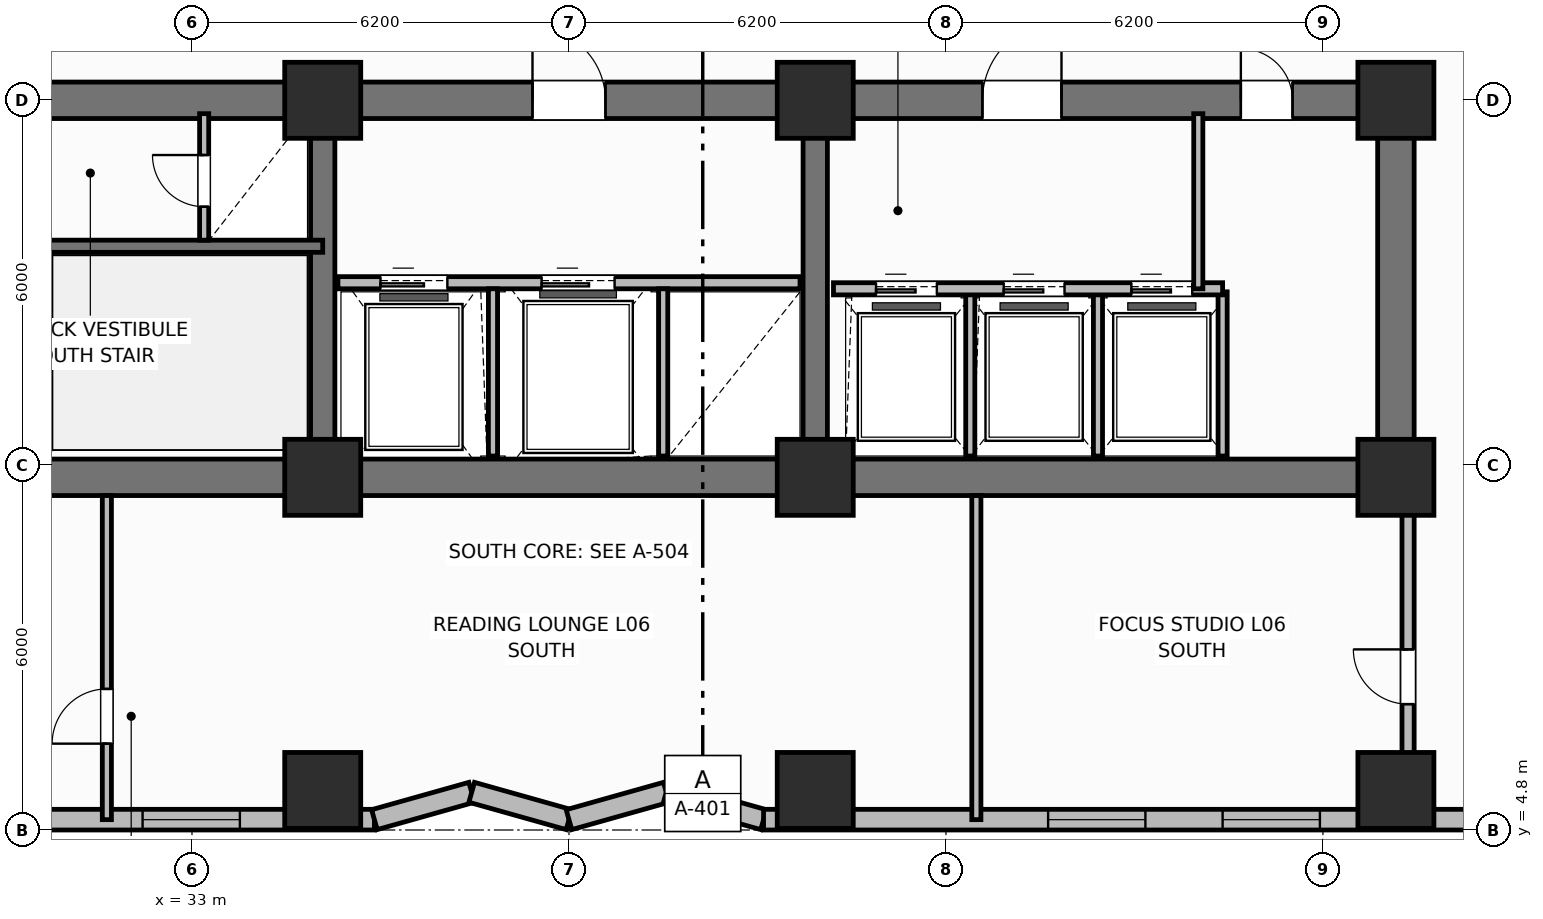
"""IFC4 building model, lengths in metres.
Left out: names, types, materials, properties, quantities, classifications, styles, units other than length and angle.
Written with IfcOpenShell. Run it as: python <this file> out.ifc"""

import sys

from ifc_helpers import new_model, si_unit, direction, frame, frame_2d, origin, origin_2d, place, context, subcontext, project, spatial, rectangle, extrude, element, fill, save


model = new_model("IFC4")
c1 = context("Model", 3, precision=1e-05, world=origin(), true_north=direction((0.0, 1.0)))
c2 = subcontext(c1, "Body", "Model", "MODEL_VIEW")
j1 = project(units=[si_unit("LENGTHUNIT", "METRE"), si_unit("PLANEANGLEUNIT", "RADIAN")], contexts=[c1])
p1 = place(None, origin())
s1 = spatial("IfcSite", under=j1, at=p1, CompositionType="ELEMENT")
p2 = place(p1, origin())
s2 = spatial("IfcBuilding", under=s1, at=p2, CompositionType="ELEMENT")
p3 = place(p2, frame((0.0, 0.0, 28.8)))
s3 = spatial("IfcBuildingStorey", under=s2, at=p3, CompositionType="ELEMENT", Elevation=28.8)
p4 = place(p3, frame((52.8, 10.6, 0.0), z_axis=(0.0, 0.0, 1.0), x_axis=(-1.0, 0.0, 0.0)))
e1 = element("IfcWall", 1, at=p4, inside=s3, PredefinedType="SHEAR", context=c2, shape_type="SweptSolid", body=[
    extrude(rectangle(XDim=27.2, YDim=0.6, at=frame_2d((13.6, 0.0))), origin(), (0.0, 0.0, 1.0), 3.7),
])
p5 = place(p3, frame((52.8, 10.9, 0.0), z_axis=(0.0, 0.0, 1.0), x_axis=(0.0, 1.0, 0.0)))
e2 = element("IfcWall", 2, at=p5, inside=s3, PredefinedType="SHEAR", context=c2, shape_type="SweptSolid", body=[
    extrude(rectangle(XDim=5.6, YDim=0.6, at=frame_2d((2.8, 0.0))), origin(), (0.0, 0.0, 1.0), 3.7),
])
p6 = place(p3, frame((25.6, 16.8, 0.0), z_axis=(0.0, 0.0, 1.0), x_axis=(1.0, 0.0, 0.0)))
e3 = element("IfcWall", 3, at=p6, inside=s3, PredefinedType="SHEAR", context=c2, shape_type="SweptSolid", body=[
    extrude(rectangle(XDim=27.2, YDim=0.6, at=frame_2d((13.6, 0.0))), origin(), (0.0, 0.0, 1.0), 3.7),
])
p7 = place(p6, frame((1.9, 0.0, 0.0)))
e4 = element("IfcOpeningElement", 4, at=p7, cuts=e3, PredefinedType="OPENING", context=c2, shape_type="SweptSolid", body=[
    extrude(rectangle(XDim=1.1, YDim=2.15, at=frame_2d((0.55, 1.075))), frame((0.0, 0.31, 0.0), z_axis=(0.0, -1.0, 0.0), x_axis=(1.0, 0.0, 0.0)), (0.0, 0.0, 1.0), 0.62),
])
p8 = place(p6, frame((13.0, 0.0, 0.0)))
e5 = element("IfcOpeningElement", 5, at=p8, cuts=e3, PredefinedType="OPENING", context=c2, shape_type="SweptSolid", body=[
    extrude(rectangle(XDim=1.2, YDim=2.15, at=frame_2d((0.6, 1.075))), frame((0.0, 0.31, 0.0), z_axis=(0.0, -1.0, 0.0), x_axis=(1.0, 0.0, 0.0)), (0.0, 0.0, 1.0), 0.62),
])
p9 = place(p6, frame((20.4, 0.0, 0.0)))
e6 = element("IfcOpeningElement", 6, at=p9, cuts=e3, PredefinedType="OPENING", context=c2, shape_type="SweptSolid", body=[
    extrude(rectangle(XDim=1.3, YDim=2.2, at=frame_2d((0.65, 1.1))), frame((0.0, 0.31, 0.0), z_axis=(0.0, -1.0, 0.0), x_axis=(1.0, 0.0, 0.0)), (0.0, 0.0, 1.0), 0.62),
])
p10 = place(p6, frame((24.65, 0.0, 0.0)))
e7 = element("IfcOpeningElement", 7, at=p10, cuts=e3, PredefinedType="OPENING", context=c2, shape_type="SweptSolid", body=[
    extrude(rectangle(XDim=0.85, YDim=2.1, at=frame_2d((0.425, 1.05))), frame((0.0, 0.31, 0.0), z_axis=(0.0, -1.0, 0.0), x_axis=(1.0, 0.0, 0.0)), (0.0, 0.0, 1.0), 0.62),
])
for number, where, z_axis, x_axis in (
    (8, (35.15, 10.9, 0.0), (0.0, 0.0, 1.0), (0.0, 1.0, 0.0)),
    (9, (43.25, 10.9, 0.0), (0.0, 0.0, 1.0), (0.0, 1.0, 0.0)),
):
    element("IfcWall", number, at=place(p3, frame(where, z_axis=z_axis, x_axis=x_axis)), inside=s3, PredefinedType="SHEAR", context=c2, shape_type="SweptSolid", body=[
        extrude(rectangle(XDim=5.6, YDim=0.4, at=frame_2d((2.8, 0.0))), origin(), (0.0, 0.0, 1.0), 3.7),
    ])
for number, where, z_axis, x_axis in (
    (10, (35.15, 10.6, 0.0), (0.0, 0.0, 1.0), (1.0, 0.0, 0.0)),
    (11, (35.15, 16.8, 0.0), (0.0, 0.0, 1.0), (1.0, 0.0, 0.0)),
    (12, (43.25, 10.6, 0.0), (0.0, 0.0, 1.0), (1.0, 0.0, 0.0)),
    (13, (43.25, 16.8, 0.0), (0.0, 0.0, 1.0), (1.0, 0.0, 0.0)),
    (14, (52.8, 10.6, 0.0), (0.0, 0.0, 1.0), (1.0, 0.0, 0.0)),
    (15, (52.8, 16.8, 0.0), (0.0, 0.0, 1.0), (1.0, 0.0, 0.0)),
    (16, (35.15, 5.45, 0.0), (0.0, 0.0, 1.0), (1.0, 0.0, 0.0)),
    (17, (43.25, 5.45, 0.0), (0.0, 0.0, 1.0), (1.0, 0.0, 0.0)),
    (18, (52.8, 5.45, 0.0), (0.0, 0.0, 1.0), (1.0, 0.0, 0.0)),
):
    element("IfcColumn", number, at=place(p3, frame(where, z_axis=z_axis, x_axis=x_axis)), inside=s3, PredefinedType="COLUMN", context=c2, shape_type="SweptSolid", body=[
        extrude(rectangle(XDim=1.25, YDim=1.25, at=origin_2d()), origin(), (0.0, 0.0, 1.0), 3.7),
    ])
p11 = place(p3, frame((18.6, 4.97, 0.0), z_axis=(0.0, 0.0, 1.0), x_axis=(1.0, 0.0, 0.0)))
e19 = element("IfcWall", 19, at=p11, inside=s3, PredefinedType="SOLIDWALL", context=c2, shape_type="SweptSolid", body=[
    extrude(rectangle(XDim=17.4, YDim=0.34, at=frame_2d((8.7, 0.0))), origin(), (0.0, 0.0, 1.0), 2.7),
])
p12 = place(p11, frame((1.863, 0.0, 0.68)))
e20 = element("IfcOpeningElement", 20, at=p12, cuts=e19, PredefinedType="OPENING", context=c2, shape_type="SweptSolid", body=[
    extrude(rectangle(XDim=1.6, YDim=1.9, at=frame_2d((0.8, 0.95))), frame((0.0, 0.18, 0.0), z_axis=(0.0, -1.0, 0.0), x_axis=(1.0, 0.0, 0.0)), (0.0, 0.0, 1.0), 0.36),
])
p13 = place(p11, frame((9.913, 0.0, 0.68)))
e21 = element("IfcOpeningElement", 21, at=p13, cuts=e19, PredefinedType="OPENING", context=c2, shape_type="SweptSolid", body=[
    extrude(rectangle(XDim=1.6, YDim=1.9, at=frame_2d((0.8, 0.95))), frame((0.0, 0.18, 0.0), z_axis=(0.0, -1.0, 0.0), x_axis=(1.0, 0.0, 0.0)), (0.0, 0.0, 1.0), 0.36),
])
p14 = place(p11, frame((13.587, 0.0, 0.68)))
e22 = element("IfcOpeningElement", 22, at=p14, cuts=e19, PredefinedType="OPENING", context=c2, shape_type="SweptSolid", body=[
    extrude(rectangle(XDim=1.6, YDim=1.9, at=frame_2d((0.8, 0.95))), frame((0.0, 0.18, 0.0), z_axis=(0.0, -1.0, 0.0), x_axis=(1.0, 0.0, 0.0)), (0.0, 0.0, 1.0), 0.36),
])
p15 = place(p3, frame((36.0, 4.97, 0.0), z_axis=(0.0, 0.0, 1.0), x_axis=(0.962662902433, 0.270703040766, 0.0)))
e23 = element("IfcWall", 23, at=p15, inside=s3, PredefinedType="SOLIDWALL", context=c2, shape_type="SweptSolid", body=[
    extrude(rectangle(XDim=1.662, YDim=0.34, at=frame_2d((0.831, 0.0))), origin(), (0.0, 0.0, 1.0), 2.7),
])
p16 = place(p3, frame((37.6, 5.42, 0.0), z_axis=(0.0, 0.0, 1.0), x_axis=(0.962652136636, -0.270741322725, 0.0)))
e24 = element("IfcWall", 24, at=p16, inside=s3, PredefinedType="SOLIDWALL", context=c2, shape_type="SweptSolid", body=[
    extrude(rectangle(XDim=1.662, YDim=0.34, at=frame_2d((0.831, 0.0))), origin(), (0.0, 0.0, 1.0), 2.7),
])
p17 = place(p3, frame((39.2, 4.97, 0.0), z_axis=(0.0, 0.0, 1.0), x_axis=(0.962662902433, 0.270703040766, 0.0)))
e25 = element("IfcWall", 25, at=p17, inside=s3, PredefinedType="SOLIDWALL", context=c2, shape_type="SweptSolid", body=[
    extrude(rectangle(XDim=1.662, YDim=0.34, at=frame_2d((0.831, 0.0))), origin(), (0.0, 0.0, 1.0), 2.7),
])
p18 = place(p3, frame((40.8, 5.42, 0.0), z_axis=(0.0, 0.0, 1.0), x_axis=(0.962652136636, -0.270741322725, 0.0)))
e26 = element("IfcWall", 26, at=p18, inside=s3, PredefinedType="SOLIDWALL", context=c2, shape_type="SweptSolid", body=[
    extrude(rectangle(XDim=1.662, YDim=0.34, at=frame_2d((0.831, 0.0))), origin(), (0.0, 0.0, 1.0), 2.7),
])
p19 = place(p3, frame((42.4, 4.97, 0.0), z_axis=(0.0, 0.0, 1.0), x_axis=(1.0, 0.0, 0.0)))
e27 = element("IfcWall", 27, at=p19, inside=s3, PredefinedType="SOLIDWALL", context=c2, shape_type="SweptSolid", body=[
    extrude(rectangle(XDim=17.4, YDim=0.34, at=frame_2d((8.7, 0.0))), origin(), (0.0, 0.0, 1.0), 2.7),
])
p20 = place(p19, frame((4.68, 0.0, 0.68)))
e28 = element("IfcOpeningElement", 28, at=p20, cuts=e27, PredefinedType="OPENING", context=c2, shape_type="SweptSolid", body=[
    extrude(rectangle(XDim=1.6, YDim=1.9, at=frame_2d((0.8, 0.95))), frame((0.0, 0.18, 0.0), z_axis=(0.0, -1.0, 0.0), x_axis=(1.0, 0.0, 0.0)), (0.0, 0.0, 1.0), 0.36),
])
p21 = place(p19, frame((7.55, 0.0, 0.68)))
e29 = element("IfcOpeningElement", 29, at=p21, cuts=e27, PredefinedType="OPENING", context=c2, shape_type="SweptSolid", body=[
    extrude(rectangle(XDim=1.6, YDim=1.9, at=frame_2d((0.8, 0.95))), frame((0.0, 0.18, 0.0), z_axis=(0.0, -1.0, 0.0), x_axis=(1.0, 0.0, 0.0)), (0.0, 0.0, 1.0), 0.36),
])
p22 = place(p19, frame((14.34, 0.0, 0.68)))
e30 = element("IfcOpeningElement", 30, at=p22, cuts=e27, PredefinedType="OPENING", context=c2, shape_type="SweptSolid", body=[
    extrude(rectangle(XDim=1.6, YDim=1.9, at=frame_2d((0.8, 0.95))), frame((0.0, 0.18, 0.0), z_axis=(0.0, -1.0, 0.0), x_axis=(1.0, 0.0, 0.0)), (0.0, 0.0, 1.0), 0.36),
])
p23 = place(p3, frame((25.6, 14.4, 0.0), z_axis=(0.0, 0.0, 1.0), x_axis=(1.0, 0.0, 0.0)))
e31 = element("IfcWall", 31, at=p23, inside=s3, PredefinedType="SHEAR", context=c2, shape_type="SweptSolid", body=[
    extrude(rectangle(XDim=9.55, YDim=0.2, at=frame_2d((4.775, 0.0))), origin(), (0.0, 0.0, 1.0), 3.7),
])
p24 = place(p23, frame((1.05, 0.0, 0.0)))
e32 = element("IfcOpeningElement", 32, at=p24, cuts=e31, PredefinedType="OPENING", context=c2, shape_type="SweptSolid", body=[
    extrude(rectangle(XDim=1.1, YDim=2.15, at=frame_2d((0.55, 1.075))), frame((0.0, 0.11, 0.0), z_axis=(0.0, -1.0, 0.0), x_axis=(1.0, 0.0, 0.0)), (0.0, 0.0, 1.0), 0.22),
])
p25 = place(p3, frame((33.2, 14.5, 0.0), z_axis=(0.0, 0.0, 1.0), x_axis=(0.0, 1.0, 0.0)))
e33 = element("IfcWall", 33, at=p25, inside=s3, PredefinedType="PARTITIONING", context=c2, shape_type="SweptSolid", body=[
    extrude(rectangle(XDim=2.08, YDim=0.15, at=frame_2d((1.04, 0.0))), origin(), (0.0, 0.0, 1.0), 2.53),
])
p26 = place(p25, frame((0.55, 0.0, 0.0)))
e34 = element("IfcOpeningElement", 34, at=p26, cuts=e33, PredefinedType="OPENING", context=c2, shape_type="SweptSolid", body=[
    extrude(rectangle(XDim=0.85, YDim=2.05, at=frame_2d((0.425, 1.025))), frame((0.0, 0.085, 0.0), z_axis=(0.0, -1.0, 0.0), x_axis=(1.0, 0.0, 0.0)), (0.0, 0.0, 1.0), 0.17),
])
p27 = place(p3, frame((35.4, 13.8, 0.0), z_axis=(0.0, 0.0, 1.0), x_axis=(1.0, 0.0, 0.0)))
e35 = element("IfcWall", 35, at=p27, inside=s3, PredefinedType="PARTITIONING", context=c2, shape_type="SweptSolid", body=[
    extrude(rectangle(XDim=7.6, YDim=0.2, at=frame_2d((3.8, 0.0))), origin(), (0.0, 0.0, 1.0), 2.3),
])
p28 = place(p27, frame((0.7, 0.0, 0.0)))
e36 = element("IfcOpeningElement", 36, at=p28, cuts=e35, PredefinedType="OPENING", context=c2, shape_type="SweptSolid", body=[
    extrude(rectangle(XDim=1.1, YDim=2.15, at=frame_2d((0.55, 1.075))), frame((0.0, 0.11, 0.0), z_axis=(0.0, -1.0, 0.0), x_axis=(1.0, 0.0, 0.0)), (0.0, 0.0, 1.0), 0.22),
])
p29 = place(p27, frame((3.35, 0.0, 0.0)))
e37 = element("IfcOpeningElement", 37, at=p29, cuts=e35, PredefinedType="OPENING", context=c2, shape_type="SweptSolid", body=[
    extrude(rectangle(XDim=1.2, YDim=2.15, at=frame_2d((0.6, 1.075))), frame((0.0, 0.11, 0.0), z_axis=(0.0, -1.0, 0.0), x_axis=(1.0, 0.0, 0.0)), (0.0, 0.0, 1.0), 0.22),
])
for number, where, z_axis, x_axis in (
    (38, (37.95, 10.95, 0.0), (0.0, 0.0, 1.0), (0.0, 1.0, 0.0)),
    (39, (40.75, 10.95, 0.0), (0.0, 0.0, 1.0), (0.0, 1.0, 0.0)),
):
    element("IfcWall", number, at=place(p3, frame(where, z_axis=z_axis, x_axis=x_axis)), inside=s3, PredefinedType="PARTITIONING", context=c2, shape_type="SweptSolid", body=[
        extrude(rectangle(XDim=2.75, YDim=0.15, at=frame_2d((1.375, 0.0))), origin(), (0.0, 0.0, 1.0), 2.53),
    ])
for number, where, z_axis, x_axis in (
    (40, (45.8, 10.95, 0.0), (0.0, 0.0, 1.0), (0.0, 1.0, 0.0)),
    (41, (47.9, 10.95, 0.0), (0.0, 0.0, 1.0), (0.0, 1.0, 0.0)),
    (42, (49.95, 10.95, 0.0), (0.0, 0.0, 1.0), (0.0, 1.0, 0.0)),
):
    element("IfcWall", number, at=place(p3, frame(where, z_axis=z_axis, x_axis=x_axis)), inside=s3, PredefinedType="PARTITIONING", context=c2, shape_type="SweptSolid", body=[
        extrude(rectangle(XDim=2.7, YDim=0.15, at=frame_2d((1.35, 0.0))), origin(), (0.0, 0.0, 1.0), 2.53),
    ])
p30 = place(p3, frame((43.55, 13.7, 0.0), z_axis=(0.0, 0.0, 1.0), x_axis=(1.0, 0.0, 0.0)))
e43 = element("IfcWall", 43, at=p30, inside=s3, PredefinedType="PARTITIONING", context=c2, shape_type="SweptSolid", body=[
    extrude(rectangle(XDim=6.4, YDim=0.2, at=frame_2d((3.2, 0.0))), origin(), (0.0, 0.0, 1.0), 2.53),
])
p31 = place(p30, frame((0.7, 0.0, 0.0)))
e44 = element("IfcOpeningElement", 44, at=p31, cuts=e43, PredefinedType="OPENING", context=c2, shape_type="SweptSolid", body=[
    extrude(rectangle(XDim=1.0, YDim=2.15, at=frame_2d((0.5, 1.075))), frame((0.0, 0.11, 0.0), z_axis=(0.0, -1.0, 0.0), x_axis=(1.0, 0.0, 0.0)), (0.0, 0.0, 1.0), 0.22),
])
p32 = place(p30, frame((2.8, 0.0, 0.0)))
e45 = element("IfcOpeningElement", 45, at=p32, cuts=e43, PredefinedType="OPENING", context=c2, shape_type="SweptSolid", body=[
    extrude(rectangle(XDim=1.0, YDim=2.15, at=frame_2d((0.5, 1.075))), frame((0.0, 0.11, 0.0), z_axis=(0.0, -1.0, 0.0), x_axis=(1.0, 0.0, 0.0)), (0.0, 0.0, 1.0), 0.22),
])
p33 = place(p30, frame((4.9, 0.0, 0.0)))
e46 = element("IfcOpeningElement", 46, at=p33, cuts=e43, PredefinedType="OPENING", context=c2, shape_type="SweptSolid", body=[
    extrude(rectangle(XDim=1.0, YDim=2.15, at=frame_2d((0.5, 1.075))), frame((0.0, 0.11, 0.0), z_axis=(0.0, -1.0, 0.0), x_axis=(1.0, 0.0, 0.0)), (0.0, 0.0, 1.0), 0.22),
])
p34 = place(p3, frame((49.55, 13.7, 0.0), z_axis=(0.0, 0.0, 1.0), x_axis=(0.0, 1.0, 0.0)))
e47 = element("IfcWall", 47, at=p34, inside=s3, PredefinedType="PARTITIONING", context=c2, shape_type="SweptSolid", body=[
    extrude(rectangle(XDim=2.88, YDim=0.15, at=frame_2d((1.44, 0.0))), origin(), (0.0, 0.0, 1.0), 2.53),
])
p35 = place(p3, frame((31.6, 4.97, 0.0), z_axis=(0.0, 0.0, 1.0), x_axis=(0.0, 1.0, 0.0)))
e48 = element("IfcWall", 48, at=p35, inside=s3, PredefinedType="PARTITIONING", context=c2, shape_type="SweptSolid", body=[
    extrude(rectangle(XDim=5.33, YDim=0.15, at=frame_2d((2.665, 0.0))), origin(), (0.0, 0.0, 1.0), 2.53),
])
p36 = place(p35, frame((1.25, 0.0, 0.0)))
e49 = element("IfcOpeningElement", 49, at=p36, cuts=e48, PredefinedType="OPENING", context=c2, shape_type="SweptSolid", body=[
    extrude(rectangle(XDim=0.9, YDim=2.1, at=frame_2d((0.45, 1.05))), frame((0.0, 0.085, 0.0), z_axis=(0.0, -1.0, 0.0), x_axis=(1.0, 0.0, 0.0)), (0.0, 0.0, 1.0), 0.17),
])
p37 = place(p3, frame((45.9, 4.97, 0.0), z_axis=(0.0, 0.0, 1.0), x_axis=(0.0, 1.0, 0.0)))
e50 = element("IfcWall", 50, at=p37, inside=s3, PredefinedType="PARTITIONING", context=c2, shape_type="SweptSolid", body=[
    extrude(rectangle(XDim=5.33, YDim=0.15, at=frame_2d((2.665, 0.0))), origin(), (0.0, 0.0, 1.0), 2.53),
])
p38 = place(p3, frame((53.0, 5.57, 0.0), z_axis=(0.0, 0.0, 1.0), x_axis=(0.0, 1.0, 0.0)))
e51 = element("IfcWall", 51, at=p38, inside=s3, PredefinedType="PARTITIONING", context=c2, shape_type="SweptSolid", body=[
    extrude(rectangle(XDim=4.73, YDim=0.2, at=frame_2d((2.365, 0.0))), origin(), (0.0, 0.0, 1.0), 2.53),
])
p39 = place(p38, frame((1.3, 0.0, 0.0)))
e52 = element("IfcOpeningElement", 52, at=p39, cuts=e51, PredefinedType="OPENING", context=c2, shape_type="SweptSolid", body=[
    extrude(rectangle(XDim=0.9, YDim=2.1, at=frame_2d((0.45, 1.05))), frame((0.0, 0.11, 0.0), z_axis=(0.0, -1.0, 0.0), x_axis=(1.0, 0.0, 0.0)), (0.0, 0.0, 1.0), 0.22),
])
p40 = place(p14, origin())
e53 = element("IfcWindow", 53, at=p40, inside=s3, PartitioningType="SINGLE_PANEL", PredefinedType="WINDOW", context=c2, shape_type="SweptSolid", body=[
    extrude(rectangle(XDim=1.6, YDim=1.9, at=frame_2d((0.8, 0.95))), frame((0.0, 0.03, 0.0), z_axis=(0.0, -1.0, 0.0), x_axis=(1.0, 0.0, 0.0)), (0.0, 0.0, 1.0), 0.06),
])
fill(e22, e53)
p41 = place(p20, origin())
e54 = element("IfcWindow", 54, at=p41, inside=s3, PartitioningType="SINGLE_PANEL", PredefinedType="WINDOW", context=c2, shape_type="SweptSolid", body=[
    extrude(rectangle(XDim=1.6, YDim=1.9, at=frame_2d((0.8, 0.95))), frame((0.0, 0.03, 0.0), z_axis=(0.0, -1.0, 0.0), x_axis=(1.0, 0.0, 0.0)), (0.0, 0.0, 1.0), 0.06),
])
fill(e28, e54)
p42 = place(p21, origin())
e55 = element("IfcWindow", 55, at=p42, inside=s3, PartitioningType="SINGLE_PANEL", PredefinedType="WINDOW", context=c2, shape_type="SweptSolid", body=[
    extrude(rectangle(XDim=1.6, YDim=1.9, at=frame_2d((0.8, 0.95))), frame((0.0, 0.03, 0.0), z_axis=(0.0, -1.0, 0.0), x_axis=(1.0, 0.0, 0.0)), (0.0, 0.0, 1.0), 0.06),
])
fill(e29, e55)
p43 = place(p26, origin())
e56 = element("IfcDoor", 56, at=p43, inside=s3, OperationType="SINGLE_SWING_RIGHT", PredefinedType="TRAPDOOR", context=c2, shape_type="SweptSolid", body=[
    extrude(rectangle(XDim=0.85, YDim=2.05, at=frame_2d((0.425, 1.025))), frame((0.0, 0.025, 0.0), z_axis=(0.0, -1.0, 0.0), x_axis=(1.0, 0.0, 0.0)), (0.0, 0.0, 1.0), 0.05),
])
fill(e34, e56)
p44 = place(p28, origin())
e57 = element("IfcDoor", 57, at=p44, inside=s3, OperationType="SLIDING_TO_LEFT", PredefinedType="DOOR", context=c2, shape_type="SweptSolid", body=[
    extrude(rectangle(XDim=1.1, YDim=2.15, at=frame_2d((0.55, 1.075))), frame((0.0, 0.025, 0.0), z_axis=(0.0, -1.0, 0.0), x_axis=(1.0, 0.0, 0.0)), (0.0, 0.0, 1.0), 0.05),
])
fill(e36, e57)
p45 = place(p29, origin())
e58 = element("IfcDoor", 58, at=p45, inside=s3, OperationType="SLIDING_TO_LEFT", PredefinedType="DOOR", context=c2, shape_type="SweptSolid", body=[
    extrude(rectangle(XDim=1.2, YDim=2.15, at=frame_2d((0.6, 1.075))), frame((0.0, 0.025, 0.0), z_axis=(0.0, -1.0, 0.0), x_axis=(1.0, 0.0, 0.0)), (0.0, 0.0, 1.0), 0.05),
])
fill(e37, e58)
p46 = place(p31, origin())
e59 = element("IfcDoor", 59, at=p46, inside=s3, OperationType="SLIDING_TO_LEFT", PredefinedType="DOOR", context=c2, shape_type="SweptSolid", body=[
    extrude(rectangle(XDim=1.0, YDim=2.15, at=frame_2d((0.5, 1.075))), frame((0.0, 0.025, 0.0), z_axis=(0.0, -1.0, 0.0), x_axis=(1.0, 0.0, 0.0)), (0.0, 0.0, 1.0), 0.05),
])
fill(e44, e59)
p47 = place(p32, origin())
e60 = element("IfcDoor", 60, at=p47, inside=s3, OperationType="SLIDING_TO_LEFT", PredefinedType="DOOR", context=c2, shape_type="SweptSolid", body=[
    extrude(rectangle(XDim=1.0, YDim=2.15, at=frame_2d((0.5, 1.075))), frame((0.0, 0.025, 0.0), z_axis=(0.0, -1.0, 0.0), x_axis=(1.0, 0.0, 0.0)), (0.0, 0.0, 1.0), 0.05),
])
fill(e45, e60)
p48 = place(p33, origin())
e61 = element("IfcDoor", 61, at=p48, inside=s3, OperationType="SLIDING_TO_LEFT", PredefinedType="DOOR", context=c2, shape_type="SweptSolid", body=[
    extrude(rectangle(XDim=1.0, YDim=2.15, at=frame_2d((0.5, 1.075))), frame((0.0, 0.025, 0.0), z_axis=(0.0, -1.0, 0.0), x_axis=(1.0, 0.0, 0.0)), (0.0, 0.0, 1.0), 0.05),
])
fill(e46, e61)
p49 = place(p36, origin())
e62 = element("IfcDoor", 62, at=p49, inside=s3, OperationType="SINGLE_SWING_LEFT", PredefinedType="DOOR", context=c2, shape_type="SweptSolid", body=[
    extrude(rectangle(XDim=0.9, YDim=2.1, at=frame_2d((0.45, 1.05))), frame((0.0, 0.025, 0.0), z_axis=(0.0, -1.0, 0.0), x_axis=(1.0, 0.0, 0.0)), (0.0, 0.0, 1.0), 0.05),
])
fill(e49, e62)
p50 = place(p39, origin())
e63 = element("IfcDoor", 63, at=p50, inside=s3, OperationType="SINGLE_SWING_RIGHT", PredefinedType="DOOR", context=c2, shape_type="SweptSolid", body=[
    extrude(rectangle(XDim=0.9, YDim=2.1, at=frame_2d((0.45, 1.05))), frame((0.0, 0.025, 0.0), z_axis=(0.0, -1.0, 0.0), x_axis=(1.0, 0.0, 0.0)), (0.0, 0.0, 1.0), 0.05),
])
fill(e52, e63)
p51 = place(p8, origin())
e64 = element("IfcDoor", 64, at=p51, inside=s3, OperationType="SINGLE_SWING_LEFT", PredefinedType="DOOR", context=c2, shape_type="SweptSolid", body=[
    extrude(rectangle(XDim=1.2, YDim=2.15, at=frame_2d((0.6, 1.075))), frame((0.0, 0.025, 0.0), z_axis=(0.0, -1.0, 0.0), x_axis=(1.0, 0.0, 0.0)), (0.0, 0.0, 1.0), 0.05),
])
fill(e5, e64)
p52 = place(p9, origin())
e65 = element("IfcDoor", 65, at=p52, inside=s3, OperationType="SINGLE_SWING_RIGHT", PredefinedType="DOOR", context=c2, shape_type="SweptSolid", body=[
    extrude(rectangle(XDim=1.3, YDim=2.2, at=frame_2d((0.65, 1.1))), frame((0.0, 0.025, 0.0), z_axis=(0.0, -1.0, 0.0), x_axis=(1.0, 0.0, 0.0)), (0.0, 0.0, 1.0), 0.05),
])
fill(e6, e65)
p53 = place(p10, origin())
e66 = element("IfcDoor", 66, at=p53, inside=s3, OperationType="SINGLE_SWING_LEFT", PredefinedType="DOOR", context=c2, shape_type="SweptSolid", body=[
    extrude(rectangle(XDim=0.85, YDim=2.1, at=frame_2d((0.425, 1.05))), frame((0.0, 0.025, 0.0), z_axis=(0.0, -1.0, 0.0), x_axis=(1.0, 0.0, 0.0)), (0.0, 0.0, 1.0), 0.05),
])
fill(e7, e66)
save(model, sys.argv[1])
